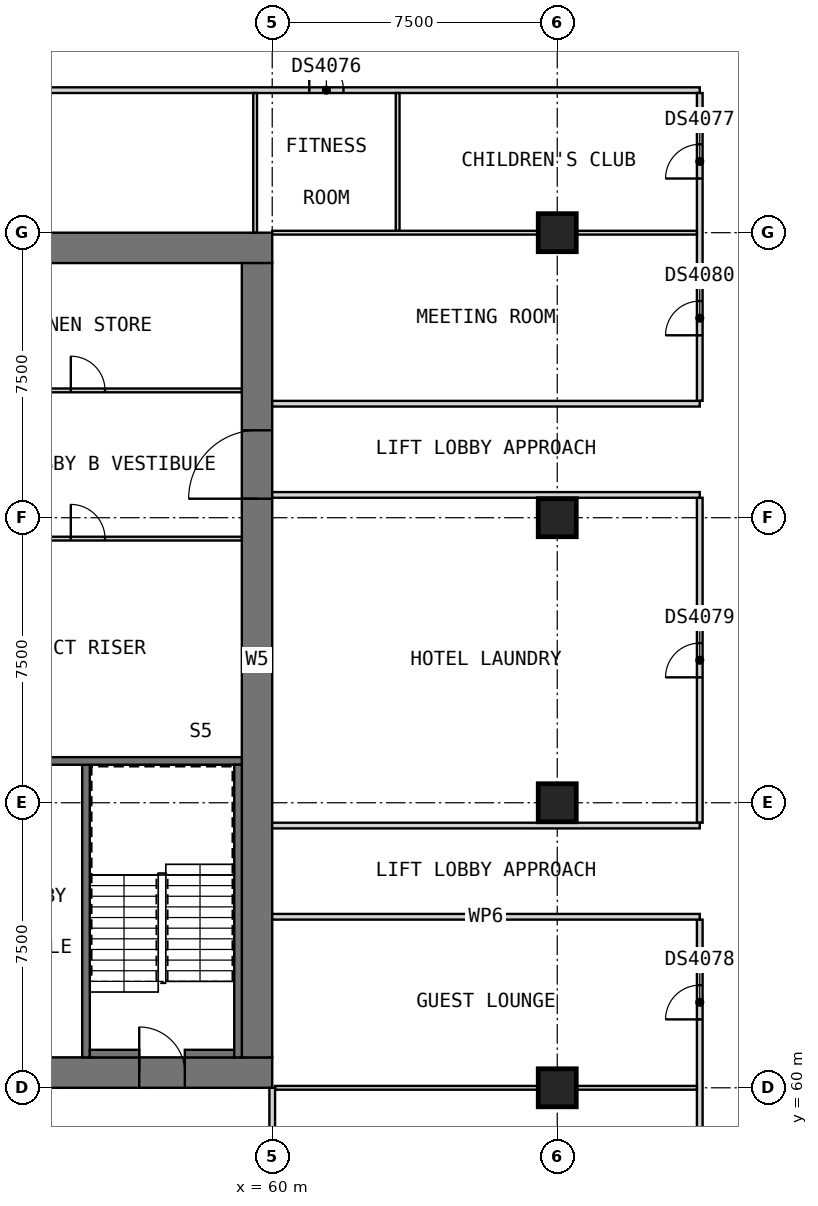
"""IFC4 building model, lengths in metres.
Left out: names, types, materials, properties, quantities, classifications, styles, units other than length and angle.
Written with IfcOpenShell. Run it as: python <this file> out.ifc"""

import sys

from ifc_helpers import new_model, si_unit, direction, frame, frame_2d, origin, origin_2d, place, context, subcontext, project, spatial, rectangle, extrude, element, fill, save


model = new_model("IFC4")
c1 = context("Model", 3, precision=1e-05, world=origin(), true_north=direction((0.0, 1.0)))
c2 = subcontext(c1, "Body", "Model", "MODEL_VIEW")
j1 = project(units=[si_unit("LENGTHUNIT", "METRE"), si_unit("PLANEANGLEUNIT", "RADIAN")], contexts=[c1])
p1 = place(None, origin())
s1 = spatial("IfcSite", under=j1, at=p1, CompositionType="ELEMENT")
p2 = place(p1, origin())
s2 = spatial("IfcBuilding", under=s1, at=p2, CompositionType="ELEMENT")
p3 = place(p2, frame((0.0, 0.0, 141.0)))
s3 = spatial("IfcBuildingStorey", under=s2, at=p3, CompositionType="ELEMENT", Elevation=141.0)
for number, where, z_axis, x_axis in (
    (1, (67.5, 60.0, 0.0), (0.0, 0.0, 1.0), (1.0, 0.0, 0.0)),
    (2, (67.5, 67.5, 0.0), (0.0, 0.0, 1.0), (1.0, 0.0, 0.0)),
    (3, (67.5, 75.0, 0.0), (0.0, 0.0, 1.0), (1.0, 0.0, 0.0)),
    (4, (67.5, 82.5, 0.0), (0.0, 0.0, 1.0), (1.0, 0.0, 0.0)),
):
    element("IfcColumn", number, at=place(p3, frame(where, z_axis=z_axis, x_axis=x_axis)), inside=s3, PredefinedType="COLUMN", context=c2, shape_type="SweptSolid", body=[
        extrude(rectangle(XDim=1.0, YDim=1.0, at=origin_2d()), origin(), (0.0, 0.0, 1.0), 3.6),
    ])
p4 = place(p3, frame((30.0, 60.4, 0.0), z_axis=(0.0, 0.0, 1.0), x_axis=(1.0, 0.0, 0.0)))
e5 = element("IfcWall", 5, at=p4, inside=s3, PredefinedType="SHEAR", context=c2, shape_type="SweptSolid", body=[
    extrude(rectangle(XDim=30.0, YDim=0.8, at=frame_2d((15.0, 0.0))), origin(), (0.0, 0.0, 1.0), 3.6),
])
p5 = place(p4, frame((21.9, 0.0, 0.0)))
e6 = element("IfcOpeningElement", 6, at=p5, cuts=e5, PredefinedType="OPENING", context=c2, shape_type="SweptSolid", body=[
    extrude(rectangle(XDim=1.8, YDim=2.1, at=frame_2d((0.9, 1.05))), frame((0.0, 0.41, 0.0), z_axis=(0.0, -1.0, 0.0), x_axis=(1.0, 0.0, 0.0)), (0.0, 0.0, 1.0), 0.82),
])
p6 = place(p4, frame((26.5, 0.0, 0.0)))
e7 = element("IfcOpeningElement", 7, at=p6, cuts=e5, PredefinedType="OPENING", context=c2, shape_type="SweptSolid", body=[
    extrude(rectangle(XDim=1.2, YDim=2.1, at=frame_2d((0.6, 1.05))), frame((0.0, 0.41, 0.0), z_axis=(0.0, -1.0, 0.0), x_axis=(1.0, 0.0, 0.0)), (0.0, 0.0, 1.0), 0.82),
])
p7 = place(p3, frame((30.0, 82.1, 0.0), z_axis=(0.0, 0.0, 1.0), x_axis=(1.0, 0.0, 0.0)))
e8 = element("IfcWall", 8, at=p7, inside=s3, PredefinedType="SHEAR", context=c2, shape_type="SweptSolid", body=[
    extrude(rectangle(XDim=30.0, YDim=0.8, at=frame_2d((15.0, 0.0))), origin(), (0.0, 0.0, 1.0), 3.6),
])
p8 = place(p3, frame((59.6, 60.8, 0.0), z_axis=(0.0, 0.0, 1.0), x_axis=(0.0, 1.0, 0.0)))
e9 = element("IfcWall", 9, at=p8, inside=s3, PredefinedType="SHEAR", context=c2, shape_type="SweptSolid", body=[
    extrude(rectangle(XDim=20.9, YDim=0.8, at=frame_2d((10.45, 0.0))), origin(), (0.0, 0.0, 1.0), 3.6),
])
p9 = place(p8, frame((14.7, 0.0, 0.0)))
e10 = element("IfcOpeningElement", 10, at=p9, cuts=e9, PredefinedType="OPENING", context=c2, shape_type="SweptSolid", body=[
    extrude(rectangle(XDim=1.8, YDim=2.1, at=frame_2d((0.9, 1.05))), frame((0.0, 0.41, 0.0), z_axis=(0.0, -1.0, 0.0), x_axis=(1.0, 0.0, 0.0)), (0.0, 0.0, 1.0), 0.82),
])
p10 = place(p3, frame((55.1, 60.8, 0.0), z_axis=(0.0, 0.0, 1.0), x_axis=(0.0, 1.0, 0.0)))
e11 = element("IfcWall", 11, at=p10, inside=s3, PredefinedType="SOLIDWALL", context=c2, shape_type="SweptSolid", body=[
    extrude(rectangle(XDim=7.8, YDim=0.2, at=frame_2d((3.9, 0.0))), origin(), (0.0, 0.0, 1.0), 3.35),
])
p11 = place(p3, frame((51.1, 68.6, 0.0), z_axis=(0.0, 0.0, 1.0), x_axis=(1.0, 0.0, 0.0)))
e12 = element("IfcWall", 12, at=p11, inside=s3, PredefinedType="SOLIDWALL", context=c2, shape_type="SweptSolid", body=[
    extrude(rectangle(XDim=8.1, YDim=0.2, at=frame_2d((4.05, 0.0))), origin(), (0.0, 0.0, 1.0), 3.35),
])
for number, where, z_axis, x_axis in (
    (13, (55.2, 60.9, 0.0), (0.0, 0.0, 1.0), (1.0, 0.0, 0.0)),
    (14, (57.7, 60.9, 0.0), (0.0, 0.0, 1.0), (1.0, 0.0, 0.0)),
):
    element("IfcWall", number, at=place(p3, frame(where, z_axis=z_axis, x_axis=x_axis)), inside=s3, PredefinedType="SOLIDWALL", context=c2, shape_type="SweptSolid", body=[
        extrude(rectangle(XDim=1.3, YDim=0.2, at=frame_2d((0.65, 0.0))), origin(), (0.0, 0.0, 1.0), 3.35),
    ])
p12 = place(p3, frame((59.1, 60.8, 0.0), z_axis=(0.0, 0.0, 1.0), x_axis=(0.0, 1.0, 0.0)))
e15 = element("IfcWall", 15, at=p12, inside=s3, PredefinedType="SOLIDWALL", context=c2, shape_type="SweptSolid", body=[
    extrude(rectangle(XDim=7.7, YDim=0.2, at=frame_2d((3.85, 0.0))), origin(), (0.0, 0.0, 1.0), 3.35),
])
p13 = place(p3, frame((51.1, 74.45, 0.0), z_axis=(0.0, 0.0, 1.0), x_axis=(1.0, 0.0, 0.0)))
e16 = element("IfcWall", 16, at=p13, inside=s3, PredefinedType="PARTITIONING", context=c2, shape_type="SweptSolid", body=[
    extrude(rectangle(XDim=8.1, YDim=0.1, at=frame_2d((4.05, 0.0))), origin(), (0.0, 0.0, 1.0), 3.35),
])
p14 = place(p13, frame((3.6, 0.0, 0.0)))
e17 = element("IfcOpeningElement", 17, at=p14, cuts=e16, PredefinedType="OPENING", context=c2, shape_type="SweptSolid", body=[
    extrude(rectangle(XDim=0.9, YDim=2.1, at=frame_2d((0.45, 1.05))), frame((0.0, 0.06, 0.0), z_axis=(0.0, -1.0, 0.0), x_axis=(1.0, 0.0, 0.0)), (0.0, 0.0, 1.0), 0.12),
])
p15 = place(p3, frame((51.1, 78.35, 0.0), z_axis=(0.0, 0.0, 1.0), x_axis=(1.0, 0.0, 0.0)))
e18 = element("IfcWall", 18, at=p15, inside=s3, PredefinedType="PARTITIONING", context=c2, shape_type="SweptSolid", body=[
    extrude(rectangle(XDim=8.1, YDim=0.1, at=frame_2d((4.05, 0.0))), origin(), (0.0, 0.0, 1.0), 3.35),
])
p16 = place(p15, frame((3.6, 0.0, 0.0)))
e19 = element("IfcOpeningElement", 19, at=p16, cuts=e18, PredefinedType="OPENING", context=c2, shape_type="SweptSolid", body=[
    extrude(rectangle(XDim=0.9, YDim=2.1, at=frame_2d((0.45, 1.05))), frame((0.0, 0.06, 0.0), z_axis=(0.0, -1.0, 0.0), x_axis=(1.0, 0.0, 0.0)), (0.0, 0.0, 1.0), 0.12),
])
p17 = place(p3, frame((33.75, 86.25, 0.0), z_axis=(0.0, 0.0, 1.0), x_axis=(1.0, 0.0, 0.0)))
e20 = element("IfcWall", 20, at=p17, inside=s3, PredefinedType="PARTITIONING", context=c2, shape_type="SweptSolid", body=[
    extrude(rectangle(XDim=37.5, YDim=0.15, at=frame_2d((18.75, 0.0))), origin(), (0.0, 0.0, 1.0), 3.35),
])
p18 = place(p17, frame((12.45, 0.0, 0.0)))
e21 = element("IfcOpeningElement", 21, at=p18, cuts=e20, PredefinedType="OPENING", context=c2, shape_type="SweptSolid", body=[
    extrude(rectangle(XDim=0.9, YDim=2.1, at=frame_2d((0.45, 1.05))), frame((0.0, 0.085, 0.0), z_axis=(0.0, -1.0, 0.0), x_axis=(1.0, 0.0, 0.0)), (0.0, 0.0, 1.0), 0.17),
])
p19 = place(p17, frame((27.225, 0.0, 0.0)))
e22 = element("IfcOpeningElement", 22, at=p19, cuts=e20, PredefinedType="OPENING", context=c2, shape_type="SweptSolid", body=[
    extrude(rectangle(XDim=0.9, YDim=2.1, at=frame_2d((0.45, 1.05))), frame((0.0, 0.085, 0.0), z_axis=(0.0, -1.0, 0.0), x_axis=(1.0, 0.0, 0.0)), (0.0, 0.0, 1.0), 0.17),
])
p20 = place(p3, frame((71.25, 52.575, 0.0), z_axis=(0.0, 0.0, 1.0), x_axis=(0.0, 1.0, 0.0)))
e23 = element("IfcWall", 23, at=p20, inside=s3, PredefinedType="PARTITIONING", context=c2, shape_type="SweptSolid", body=[
    extrude(rectangle(XDim=11.85, YDim=0.15, at=frame_2d((5.925, 0.0))), origin(), (0.0, 0.0, 1.0), 3.35),
])
p21 = place(p20, frame((9.225, 0.0, 0.0)))
e24 = element("IfcOpeningElement", 24, at=p21, cuts=e23, PredefinedType="OPENING", context=c2, shape_type="SweptSolid", body=[
    extrude(rectangle(XDim=0.9, YDim=2.1, at=frame_2d((0.45, 1.05))), frame((0.0, 0.085, 0.0), z_axis=(0.0, -1.0, 0.0), x_axis=(1.0, 0.0, 0.0)), (0.0, 0.0, 1.0), 0.17),
])
p22 = place(p3, frame((71.25, 66.975, 0.0), z_axis=(0.0, 0.0, 1.0), x_axis=(0.0, 1.0, 0.0)))
e25 = element("IfcWall", 25, at=p22, inside=s3, PredefinedType="PARTITIONING", context=c2, shape_type="SweptSolid", body=[
    extrude(rectangle(XDim=8.55, YDim=0.15, at=frame_2d((4.275, 0.0))), origin(), (0.0, 0.0, 1.0), 3.35),
])
p23 = place(p22, frame((3.825, 0.0, 0.0)))
e26 = element("IfcOpeningElement", 26, at=p23, cuts=e25, PredefinedType="OPENING", context=c2, shape_type="SweptSolid", body=[
    extrude(rectangle(XDim=0.9, YDim=2.1, at=frame_2d((0.45, 1.05))), frame((0.0, 0.085, 0.0), z_axis=(0.0, -1.0, 0.0), x_axis=(1.0, 0.0, 0.0)), (0.0, 0.0, 1.0), 0.17),
])
p24 = place(p3, frame((71.25, 78.075, 0.0), z_axis=(0.0, 0.0, 1.0), x_axis=(0.0, 1.0, 0.0)))
e27 = element("IfcWall", 27, at=p24, inside=s3, PredefinedType="PARTITIONING", context=c2, shape_type="SweptSolid", body=[
    extrude(rectangle(XDim=8.1, YDim=0.15, at=frame_2d((4.05, 0.0))), origin(), (0.0, 0.0, 1.0), 3.35),
])
p25 = place(p24, frame((5.85, 0.0, 0.0)))
e28 = element("IfcOpeningElement", 28, at=p25, cuts=e27, PredefinedType="OPENING", context=c2, shape_type="SweptSolid", body=[
    extrude(rectangle(XDim=0.9, YDim=2.1, at=frame_2d((0.45, 1.05))), frame((0.0, 0.085, 0.0), z_axis=(0.0, -1.0, 0.0), x_axis=(1.0, 0.0, 0.0)), (0.0, 0.0, 1.0), 0.17),
])
p26 = place(p24, frame((1.725, 0.0, 0.0)))
e29 = element("IfcOpeningElement", 29, at=p26, cuts=e27, PredefinedType="OPENING", context=c2, shape_type="SweptSolid", body=[
    extrude(rectangle(XDim=0.9, YDim=2.1, at=frame_2d((0.45, 1.05))), frame((0.0, 0.085, 0.0), z_axis=(0.0, -1.0, 0.0), x_axis=(1.0, 0.0, 0.0)), (0.0, 0.0, 1.0), 0.17),
])
p27 = place(p3, frame((60.075, 60.0, 0.0), z_axis=(0.0, 0.0, 1.0), x_axis=(1.0, 0.0, 0.0)))
e30 = element("IfcWall", 30, at=p27, inside=s3, PredefinedType="PARTITIONING", context=c2, shape_type="SweptSolid", body=[
    extrude(rectangle(XDim=11.1, YDim=0.1, at=frame_2d((5.55, 0.0))), origin(), (0.0, 0.0, 1.0), 3.35),
])
p28 = place(p3, frame((60.0, 82.5, 0.0), z_axis=(0.0, 0.0, 1.0), x_axis=(1.0, 0.0, 0.0)))
e31 = element("IfcWall", 31, at=p28, inside=s3, PredefinedType="PARTITIONING", context=c2, shape_type="SweptSolid", body=[
    extrude(rectangle(XDim=11.175, YDim=0.1, at=frame_2d((5.587, 0.0))), origin(), (0.0, 0.0, 1.0), 3.35),
])
p29 = place(p3, frame((59.55, 82.5, 0.0), z_axis=(0.0, 0.0, 1.0), x_axis=(0.0, 1.0, 0.0)))
e32 = element("IfcWall", 32, at=p29, inside=s3, PredefinedType="PARTITIONING", context=c2, shape_type="SweptSolid", body=[
    extrude(rectangle(XDim=3.675, YDim=0.1, at=frame_2d((1.837, 0.0))), origin(), (0.0, 0.0, 1.0), 3.35),
])
p30 = place(p3, frame((63.3, 82.55, 0.0), z_axis=(0.0, 0.0, 1.0), x_axis=(0.0, 1.0, 0.0)))
e33 = element("IfcWall", 33, at=p30, inside=s3, PredefinedType="PARTITIONING", context=c2, shape_type="SweptSolid", body=[
    extrude(rectangle(XDim=3.625, YDim=0.1, at=frame_2d((1.812, 0.0))), origin(), (0.0, 0.0, 1.0), 3.35),
])
for number, where, z_axis, x_axis in (
    (34, (60.0, 64.5, 0.0), (0.0, 0.0, 1.0), (1.0, 0.0, 0.0)),
    (35, (60.0, 66.9, 0.0), (0.0, 0.0, 1.0), (1.0, 0.0, 0.0)),
    (36, (60.0, 75.6, 0.0), (0.0, 0.0, 1.0), (1.0, 0.0, 0.0)),
    (37, (60.0, 78.0, 0.0), (0.0, 0.0, 1.0), (1.0, 0.0, 0.0)),
):
    element("IfcWall", number, at=place(p3, frame(where, z_axis=z_axis, x_axis=x_axis)), inside=s3, PredefinedType="PARTITIONING", context=c2, shape_type="SweptSolid", body=[
        extrude(rectangle(XDim=11.25, YDim=0.15, at=frame_2d((5.625, 0.0))), origin(), (0.0, 0.0, 1.0), 3.35),
    ])
p31 = place(p3, frame((60.0, 52.575, 0.0), z_axis=(0.0, 0.0, 1.0), x_axis=(0.0, 1.0, 0.0)))
e38 = element("IfcWall", 38, at=p31, inside=s3, PredefinedType="PARTITIONING", context=c2, shape_type="SweptSolid", body=[
    extrude(rectangle(XDim=7.425, YDim=0.15, at=frame_2d((3.712, 0.0))), origin(), (0.0, 0.0, 1.0), 3.35),
])
p32 = place(p9, origin())
e39 = element("IfcDoor", 39, at=p32, inside=s3, OperationType="DOUBLE_DOOR_SINGLE_SWING", PredefinedType="DOOR", context=c2, shape_type="SweptSolid", body=[
    extrude(rectangle(XDim=1.8, YDim=2.1, at=frame_2d((0.9, 1.05))), frame((0.0, 0.025, 0.0), z_axis=(0.0, -1.0, 0.0), x_axis=(1.0, 0.0, 0.0)), (0.0, 0.0, 1.0), 0.05),
])
fill(e10, e39)
p33 = place(p6, origin())
e40 = element("IfcDoor", 40, at=p33, inside=s3, OperationType="SINGLE_SWING_LEFT", PredefinedType="DOOR", context=c2, shape_type="SweptSolid", body=[
    extrude(rectangle(XDim=1.2, YDim=2.1, at=frame_2d((0.6, 1.05))), frame((0.0, 0.025, 0.0), z_axis=(0.0, -1.0, 0.0), x_axis=(1.0, 0.0, 0.0)), (0.0, 0.0, 1.0), 0.05),
])
fill(e7, e40)
p34 = place(p14, origin())
e41 = element("IfcDoor", 41, at=p34, inside=s3, OperationType="SINGLE_SWING_RIGHT", PredefinedType="DOOR", context=c2, shape_type="SweptSolid", body=[
    extrude(rectangle(XDim=0.9, YDim=2.1, at=frame_2d((0.45, 1.05))), frame((0.0, 0.025, 0.0), z_axis=(0.0, -1.0, 0.0), x_axis=(1.0, 0.0, 0.0)), (0.0, 0.0, 1.0), 0.05),
])
fill(e17, e41)
p35 = place(p16, origin())
e42 = element("IfcDoor", 42, at=p35, inside=s3, OperationType="SINGLE_SWING_RIGHT", PredefinedType="DOOR", context=c2, shape_type="SweptSolid", body=[
    extrude(rectangle(XDim=0.9, YDim=2.1, at=frame_2d((0.45, 1.05))), frame((0.0, 0.025, 0.0), z_axis=(0.0, -1.0, 0.0), x_axis=(1.0, 0.0, 0.0)), (0.0, 0.0, 1.0), 0.05),
])
fill(e19, e42)
p36 = place(p19, origin())
e43 = element("IfcDoor", 43, at=p36, inside=s3, OperationType="SINGLE_SWING_RIGHT", PredefinedType="DOOR", context=c2, shape_type="SweptSolid", body=[
    extrude(rectangle(XDim=0.9, YDim=2.1, at=frame_2d((0.45, 1.05))), frame((0.0, 0.025, 0.0), z_axis=(0.0, -1.0, 0.0), x_axis=(1.0, 0.0, 0.0)), (0.0, 0.0, 1.0), 0.05),
])
fill(e22, e43)
p37 = place(p25, origin())
e44 = element("IfcDoor", 44, at=p37, inside=s3, OperationType="SINGLE_SWING_LEFT", PredefinedType="DOOR", context=c2, shape_type="SweptSolid", body=[
    extrude(rectangle(XDim=0.9, YDim=2.1, at=frame_2d((0.45, 1.05))), frame((0.0, 0.025, 0.0), z_axis=(0.0, -1.0, 0.0), x_axis=(1.0, 0.0, 0.0)), (0.0, 0.0, 1.0), 0.05),
])
fill(e28, e44)
p38 = place(p21, origin())
e45 = element("IfcDoor", 45, at=p38, inside=s3, OperationType="SINGLE_SWING_LEFT", PredefinedType="DOOR", context=c2, shape_type="SweptSolid", body=[
    extrude(rectangle(XDim=0.9, YDim=2.1, at=frame_2d((0.45, 1.05))), frame((0.0, 0.025, 0.0), z_axis=(0.0, -1.0, 0.0), x_axis=(1.0, 0.0, 0.0)), (0.0, 0.0, 1.0), 0.05),
])
fill(e24, e45)
p39 = place(p23, origin())
e46 = element("IfcDoor", 46, at=p39, inside=s3, OperationType="SINGLE_SWING_LEFT", PredefinedType="DOOR", context=c2, shape_type="SweptSolid", body=[
    extrude(rectangle(XDim=0.9, YDim=2.1, at=frame_2d((0.45, 1.05))), frame((0.0, 0.025, 0.0), z_axis=(0.0, -1.0, 0.0), x_axis=(1.0, 0.0, 0.0)), (0.0, 0.0, 1.0), 0.05),
])
fill(e26, e46)
p40 = place(p26, origin())
e47 = element("IfcDoor", 47, at=p40, inside=s3, OperationType="SINGLE_SWING_LEFT", PredefinedType="DOOR", context=c2, shape_type="SweptSolid", body=[
    extrude(rectangle(XDim=0.9, YDim=2.1, at=frame_2d((0.45, 1.05))), frame((0.0, 0.025, 0.0), z_axis=(0.0, -1.0, 0.0), x_axis=(1.0, 0.0, 0.0)), (0.0, 0.0, 1.0), 0.05),
])
fill(e29, e47)
save(model, sys.argv[1])
